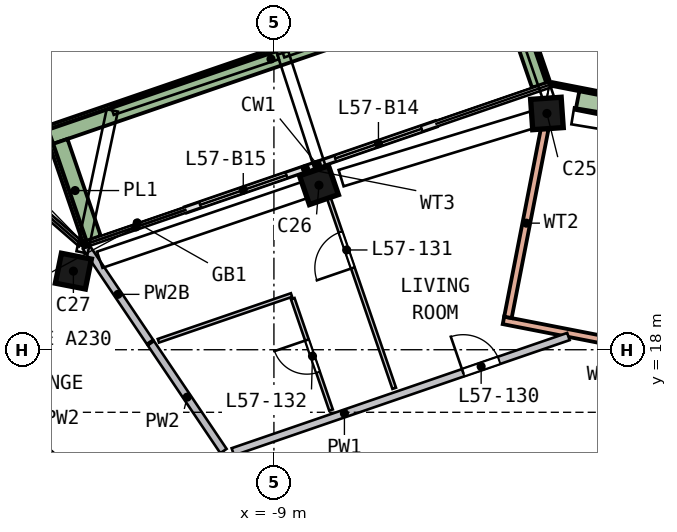
"""IFC4 building model, lengths in metres.
Left out: names, types, materials, properties, quantities, classifications, styles, units other than length and angle.
Written with IfcOpenShell. Run it as: python <this file> out.ifc"""

import sys

from ifc_helpers import new_model, si_unit, direction, frame, frame_2d, origin, origin_2d, place, context, subcontext, project, spatial, rectangle, extrude, element, fill, save


model = new_model("IFC4")
c1 = context("Model", 3, precision=1e-05, world=origin(), true_north=direction((0.0, 1.0)))
c2 = subcontext(c1, "Body", "Model", "MODEL_VIEW")
j1 = project(units=[si_unit("LENGTHUNIT", "METRE"), si_unit("PLANEANGLEUNIT", "RADIAN")], contexts=[c1])
p1 = place(None, origin())
s1 = spatial("IfcSite", under=j1, at=p1, CompositionType="ELEMENT")
p2 = place(p1, origin())
s2 = spatial("IfcBuilding", under=s1, at=p2, CompositionType="ELEMENT")
p3 = place(p2, frame((0.0, 0.0, 234.0)))
s3 = spatial("IfcBuildingStorey", under=s2, at=p3, CompositionType="ELEMENT", Elevation=234.0)
p4 = place(p3, frame((-1.677, 24.228, 0.0), z_axis=(-0.11509856, -0.008894671, 0.993314254), x_axis=(0.990975997, 0.068122893, 0.115437627)))
e1 = element("IfcColumn", 1, at=p4, inside=s3, PredefinedType="COLUMN", context=c2, shape_type="SweptSolid", body=[
    extrude(rectangle(XDim=0.8, YDim=0.8, at=origin_2d()), origin(), (0.0, 0.0, 1.0), 3.211),
])
p5 = place(p3, frame((-7.687, 22.375, 0.0), z_axis=(-0.106162851, -0.037491609, 0.9936417), x_axis=(-0.939706935, -0.322917335, -0.112584504)))
e2 = element("IfcColumn", 2, at=p5, inside=s3, PredefinedType="COLUMN", context=c2, shape_type="SweptSolid", body=[
    extrude(rectangle(XDim=0.8, YDim=0.8, at=origin_2d()), origin(), (0.0, 0.0, 1.0), 3.21),
])
p6 = place(p3, frame((-14.162, 20.15, 0.0), z_axis=(-0.095237688, -0.068178935, 0.99311702), x_axis=(0.977061019, -0.197299919, 0.080153025)))
e3 = element("IfcColumn", 3, at=p6, inside=s3, PredefinedType="COLUMN", context=c2, shape_type="SweptSolid", body=[
    extrude(rectangle(XDim=0.8, YDim=0.8, at=origin_2d()), origin(), (0.0, 0.0, 1.0), 3.212),
])
p7 = place(p3, frame((-4.736, 23.943, 0.0), z_axis=(0.0, 0.0, 1.0), x_axis=(-0.945766173, -0.32484819, 0.0)))
e4 = element("IfcWall", 4, at=p7, inside=s3, PredefinedType="SOLIDWALL", context=c2, shape_type="SweptSolid", body=[
    extrude(rectangle(XDim=3.3, YDim=0.15, at=frame_2d((1.65, 0.0))), origin(), (0.0, 0.0, 1.0), 2.525),
])
p8 = place(p7, frame((0.4, 0.0, 0.0)))
e5 = element("IfcOpeningElement", 5, at=p8, cuts=e4, PredefinedType="OPENING", context=c2, shape_type="SweptSolid", body=[
    extrude(rectangle(XDim=2.4, YDim=2.4, at=frame_2d((1.2, 1.2))), frame((0.0, 0.085, 0.0), z_axis=(0.0, -1.0, 0.0), x_axis=(1.0, 0.0, 0.0)), (0.0, 0.0, 1.0), 0.17),
])
p9 = place(p3, frame((-7.857, 22.871, 0.0), z_axis=(0.0, 0.0, 1.0), x_axis=(-0.945735915, -0.32493627, 0.0)))
e6 = element("IfcWall", 6, at=p9, inside=s3, PredefinedType="SOLIDWALL", context=c2, shape_type="SweptSolid", body=[
    extrude(rectangle(XDim=3.661, YDim=0.15, at=frame_2d((1.831, 0.0))), origin(), (0.0, 0.0, 1.0), 2.525),
])
p10 = place(p9, frame((0.861, 0.0, 0.0)))
e7 = element("IfcOpeningElement", 7, at=p10, cuts=e6, PredefinedType="OPENING", context=c2, shape_type="SweptSolid", body=[
    extrude(rectangle(XDim=2.4, YDim=2.4, at=frame_2d((1.2, 1.2))), frame((0.0, 0.085, 0.0), z_axis=(0.0, -1.0, 0.0), x_axis=(1.0, 0.0, 0.0)), (0.0, 0.0, 1.0), 0.17),
])
p11 = place(p3, frame((-1.971, 24.974, 0.0), z_axis=(0.0, 0.0, 1.0), x_axis=(-0.324892063, 0.945751102, 0.0)))
e8 = element("IfcWall", 8, at=p11, inside=s3, PredefinedType="SOLIDWALL", context=c2, shape_type="SweptSolid", body=[
    extrude(rectangle(XDim=3.199, YDim=0.5, at=frame_2d((1.6, 0.0))), origin(), (0.0, 0.0, 1.0), 0.7),
])
p12 = place(p3, frame((-3.166, 27.682, 0.0), z_axis=(0.0, 0.0, 1.0), x_axis=(-0.945747002, -0.324903998, 0.0)))
e9 = element("IfcWall", 9, at=p12, inside=s3, PredefinedType="SOLIDWALL", context=c2, shape_type="SweptSolid", body=[
    extrude(rectangle(XDim=12.5, YDim=0.5, at=frame_2d((6.25, 0.0))), origin(), (0.0, 0.0, 1.0), 0.7),
])
p13 = place(p3, frame((-14.67, 23.465, 0.0), z_axis=(0.0, 0.0, 1.0), x_axis=(0.324925551, -0.945739598, 0.0)))
e10 = element("IfcWall", 10, at=p13, inside=s3, PredefinedType="SOLIDWALL", context=c2, shape_type="SweptSolid", body=[
    extrude(rectangle(XDim=2.699, YDim=0.5, at=frame_2d((1.35, 0.0))), origin(), (0.0, 0.0, 1.0), 0.7),
])
p14 = place(p3, frame((-2.96, 18.772, 0.0), z_axis=(0.0, 0.0, 1.0), x_axis=(0.981496446, -0.191480354, 0.0)))
e11 = element("IfcWall", 11, at=p14, inside=s3, PredefinedType="SOLIDWALL", context=c2, shape_type="SweptSolid", body=[
    extrude(rectangle(XDim=13.0, YDim=0.2, at=frame_2d((6.5, 0.0))), origin(), (0.0, 0.0, 1.0), 3.19),
])
p15 = place(p14, frame((5.6, 0.0, 0.0)))
e12 = element("IfcOpeningElement", 12, at=p15, cuts=e11, PredefinedType="OPENING", context=c2, shape_type="SweptSolid", body=[
    extrude(rectangle(XDim=1.8, YDim=2.4, at=frame_2d((0.9, 1.2))), frame((0.0, 0.11, 0.0), z_axis=(0.0, -1.0, 0.0), x_axis=(1.0, 0.0, 0.0)), (0.0, 0.0, 1.0), 0.22),
])
p16 = place(p3, frame((-1.875, 23.81, 0.0), z_axis=(0.0, 0.0, 1.0), x_axis=(-0.191467212, -0.98149901, 0.0)))
e13 = element("IfcWall", 13, at=p16, inside=s3, PredefinedType="SOLIDWALL", context=c2, shape_type="SweptSolid", body=[
    extrude(rectangle(XDim=5.052, YDim=0.2, at=frame_2d((2.526, 0.0))), origin(), (0.0, 0.0, 1.0), 3.19),
])
p17 = place(p3, frame((10.937, 22.531, 0.0), z_axis=(0.0, 0.0, 1.0), x_axis=(-0.981494863, 0.191488469, 0.0)))
e14 = element("IfcWall", 14, at=p17, inside=s3, PredefinedType="SOLIDWALL", context=c2, shape_type="SweptSolid", body=[
    extrude(rectangle(XDim=12.84, YDim=0.1, at=frame_2d((6.42, 0.0))), origin(), (0.0, 0.0, 1.0), 0.7),
])
p18 = place(p3, frame((3.733, 23.631, 0.0), z_axis=(0.0, 0.0, 1.0), x_axis=(-0.981492444, 0.191500867, 0.0)))
e15 = element("IfcWall", 15, at=p18, inside=s3, PredefinedType="SOLIDWALL", context=c2, shape_type="SweptSolid", body=[
    extrude(rectangle(XDim=4.834, YDim=0.5, at=frame_2d((2.417, 0.0))), origin(), (0.0, 0.0, 1.0), 0.7),
])
p19 = place(p3, frame((-10.081, 15.314, 0.0), z_axis=(0.0, 0.0, 1.0), x_axis=(0.945740847, 0.324921914, 0.0)))
e16 = element("IfcWall", 16, at=p19, inside=s3, PredefinedType="SOLIDWALL", context=c2, shape_type="SweptSolid", body=[
    extrude(rectangle(XDim=9.337, YDim=0.2, at=frame_2d((4.668, 0.0))), origin(), (0.0, 0.0, 1.0), 3.19),
])
p20 = place(p19, frame((6.408, 0.0, 0.0)))
e17 = element("IfcOpeningElement", 17, at=p20, cuts=e16, PredefinedType="OPENING", context=c2, shape_type="SweptSolid", body=[
    extrude(rectangle(XDim=1.0, YDim=2.1, at=frame_2d((0.5, 1.05))), frame((0.0, 0.11, 0.0), z_axis=(0.0, -1.0, 0.0), x_axis=(1.0, 0.0, 0.0)), (0.0, 0.0, 1.0), 0.22),
])
p21 = place(p3, frame((-14.594, 10.586, 0.0), z_axis=(0.0, 0.0, 1.0), x_axis=(-0.754250867, 0.656586346, 0.0)))
e18 = element("IfcWall", 18, at=p21, inside=s3, PredefinedType="SOLIDWALL", context=c2, shape_type="SweptSolid", body=[
    extrude(rectangle(XDim=12.556, YDim=0.2, at=frame_2d((6.278, 0.0))), origin(), (0.0, 0.0, 1.0), 3.19),
])
p22 = place(p21, frame((3.8, 0.0, 0.0)))
e19 = element("IfcOpeningElement", 19, at=p22, cuts=e18, PredefinedType="OPENING", context=c2, shape_type="SweptSolid", body=[
    extrude(rectangle(XDim=1.0, YDim=2.1, at=frame_2d((0.5, 1.05))), frame((0.0, 0.11, 0.0), z_axis=(0.0, -1.0, 0.0), x_axis=(1.0, 0.0, 0.0)), (0.0, 0.0, 1.0), 0.22),
])
p23 = place(p3, frame((-21.889, 21.331, 0.0), z_axis=(0.0, 0.0, 1.0), x_axis=(0.754259249, -0.656576717, 0.0)))
e20 = element("IfcWall", 20, at=p23, inside=s3, PredefinedType="SOLIDWALL", context=c2, shape_type="SweptSolid", body=[
    extrude(rectangle(XDim=12.557, YDim=0.2, at=frame_2d((6.278, 0.0))), origin(), (0.0, 0.0, 1.0), 3.19),
])
p24 = place(p23, frame((3.9, 0.0, 0.0)))
e21 = element("IfcOpeningElement", 21, at=p24, cuts=e20, PredefinedType="OPENING", context=c2, shape_type="SweptSolid", body=[
    extrude(rectangle(XDim=1.0, YDim=2.1, at=frame_2d((0.5, 1.05))), frame((0.0, 0.11, 0.0), z_axis=(0.0, -1.0, 0.0), x_axis=(1.0, 0.0, 0.0)), (0.0, 0.0, 1.0), 0.22),
])
p25 = place(p3, frame((-13.945, 20.706, 0.0), z_axis=(0.0, 0.0, 1.0), x_axis=(0.558585582, -0.829446893, 0.0)))
e22 = element("IfcWall", 22, at=p25, inside=s3, PredefinedType="SOLIDWALL", context=c2, shape_type="SweptSolid", body=[
    extrude(rectangle(XDim=3.011, YDim=0.2, at=frame_2d((1.506, 0.0))), origin(), (0.0, 0.0, 1.0), 2.69),
])
p26 = place(p3, frame((-12.237, 18.17, 0.0), z_axis=(0.0, 0.0, 1.0), x_axis=(0.558600379, -0.829436927, 0.0)))
e23 = element("IfcWall", 23, at=p26, inside=s3, PredefinedType="SOLIDWALL", context=c2, shape_type="SweptSolid", body=[
    extrude(rectangle(XDim=3.418, YDim=0.2, at=frame_2d((1.709, 0.0))), origin(), (0.0, 0.0, 1.0), 3.19),
])
p27 = place(p3, frame((-8.537, 19.439, 0.0), z_axis=(0.0, 0.0, 1.0), x_axis=(-0.94573661, -0.324934246, 0.0)))
e24 = element("IfcWall", 24, at=p27, inside=s3, PredefinedType="PARTITIONING", context=c2, shape_type="SweptSolid", body=[
    extrude(rectangle(XDim=3.704, YDim=0.1, at=frame_2d((1.852, 0.0))), origin(), (0.0, 0.0, 1.0), 3.19),
])
p28 = place(p3, frame((-7.498, 16.413, 0.0), z_axis=(0.0, 0.0, 1.0), x_axis=(-0.324861861, 0.945761477, 0.0)))
e25 = element("IfcWall", 25, at=p28, inside=s3, PredefinedType="PARTITIONING", context=c2, shape_type="SweptSolid", body=[
    extrude(rectangle(XDim=3.1, YDim=0.1, at=frame_2d((1.55, 0.0))), origin(), (0.0, 0.0, 1.0), 3.19),
])
p29 = place(p28, frame((1.05, 0.0, 0.0)))
e26 = element("IfcOpeningElement", 26, at=p29, cuts=e25, PredefinedType="OPENING", context=c2, shape_type="SweptSolid", body=[
    extrude(rectangle(XDim=0.9, YDim=2.1, at=frame_2d((0.45, 1.05))), frame((0.0, 0.06, 0.0), z_axis=(0.0, -1.0, 0.0), x_axis=(1.0, 0.0, 0.0)), (0.0, 0.0, 1.0), 0.12),
])
p30 = place(p3, frame((-5.835, 16.984, 0.0), z_axis=(0.0, 0.0, 1.0), x_axis=(-0.324920005, 0.945741503, 0.0)))
e27 = element("IfcWall", 27, at=p30, inside=s3, PredefinedType="PARTITIONING", context=c2, shape_type="SweptSolid", body=[
    extrude(rectangle(XDim=6.15, YDim=0.1, at=frame_2d((3.075, 0.0))), origin(), (0.0, 0.0, 1.0), 3.19),
])
p31 = place(p30, frame((3.35, 0.0, 0.0)))
e28 = element("IfcOpeningElement", 28, at=p31, cuts=e27, PredefinedType="OPENING", context=c2, shape_type="SweptSolid", body=[
    extrude(rectangle(XDim=1.0, YDim=2.1, at=frame_2d((0.5, 1.05))), frame((0.0, 0.06, 0.0), z_axis=(0.0, -1.0, 0.0), x_axis=(1.0, 0.0, 0.0)), (0.0, 0.0, 1.0), 0.12),
])
p32 = place(p8, origin())
e29 = element("IfcDoor", 29, at=p32, inside=s3, OperationType="SLIDING_TO_RIGHT", PredefinedType="DOOR", context=c2, shape_type="SweptSolid", body=[
    extrude(rectangle(XDim=2.4, YDim=2.4, at=frame_2d((1.2, 1.2))), frame((0.0, 0.025, 0.0), z_axis=(0.0, -1.0, 0.0), x_axis=(1.0, 0.0, 0.0)), (0.0, 0.0, 1.0), 0.05),
])
fill(e5, e29)
p33 = place(p10, origin())
e30 = element("IfcDoor", 30, at=p33, inside=s3, OperationType="SLIDING_TO_LEFT", PredefinedType="DOOR", context=c2, shape_type="SweptSolid", body=[
    extrude(rectangle(XDim=2.4, YDim=2.4, at=frame_2d((1.2, 1.2))), frame((0.0, 0.025, 0.0), z_axis=(0.0, -1.0, 0.0), x_axis=(1.0, 0.0, 0.0)), (0.0, 0.0, 1.0), 0.05),
])
fill(e7, e30)
p34 = place(p20, origin())
e31 = element("IfcDoor", 31, at=p34, inside=s3, OperationType="SINGLE_SWING_LEFT", PredefinedType="DOOR", context=c2, shape_type="SweptSolid", body=[
    extrude(rectangle(XDim=1.0, YDim=2.1, at=frame_2d((0.5, 1.05))), frame((0.0, 0.025, 0.0), z_axis=(0.0, -1.0, 0.0), x_axis=(1.0, 0.0, 0.0)), (0.0, 0.0, 1.0), 0.05),
])
fill(e17, e31)
p35 = place(p31, origin())
e32 = element("IfcDoor", 32, at=p35, inside=s3, OperationType="SINGLE_SWING_LEFT", PredefinedType="DOOR", context=c2, shape_type="SweptSolid", body=[
    extrude(rectangle(XDim=1.0, YDim=2.1, at=frame_2d((0.5, 1.05))), frame((0.0, 0.025, 0.0), z_axis=(0.0, -1.0, 0.0), x_axis=(1.0, 0.0, 0.0)), (0.0, 0.0, 1.0), 0.05),
])
fill(e28, e32)
p36 = place(p29, origin())
e33 = element("IfcDoor", 33, at=p36, inside=s3, OperationType="SINGLE_SWING_RIGHT", PredefinedType="DOOR", context=c2, shape_type="SweptSolid", body=[
    extrude(rectangle(XDim=0.9, YDim=2.1, at=frame_2d((0.45, 1.05))), frame((0.0, 0.025, 0.0), z_axis=(0.0, -1.0, 0.0), x_axis=(1.0, 0.0, 0.0)), (0.0, 0.0, 1.0), 0.05),
])
fill(e26, e33)
save(model, sys.argv[1])
